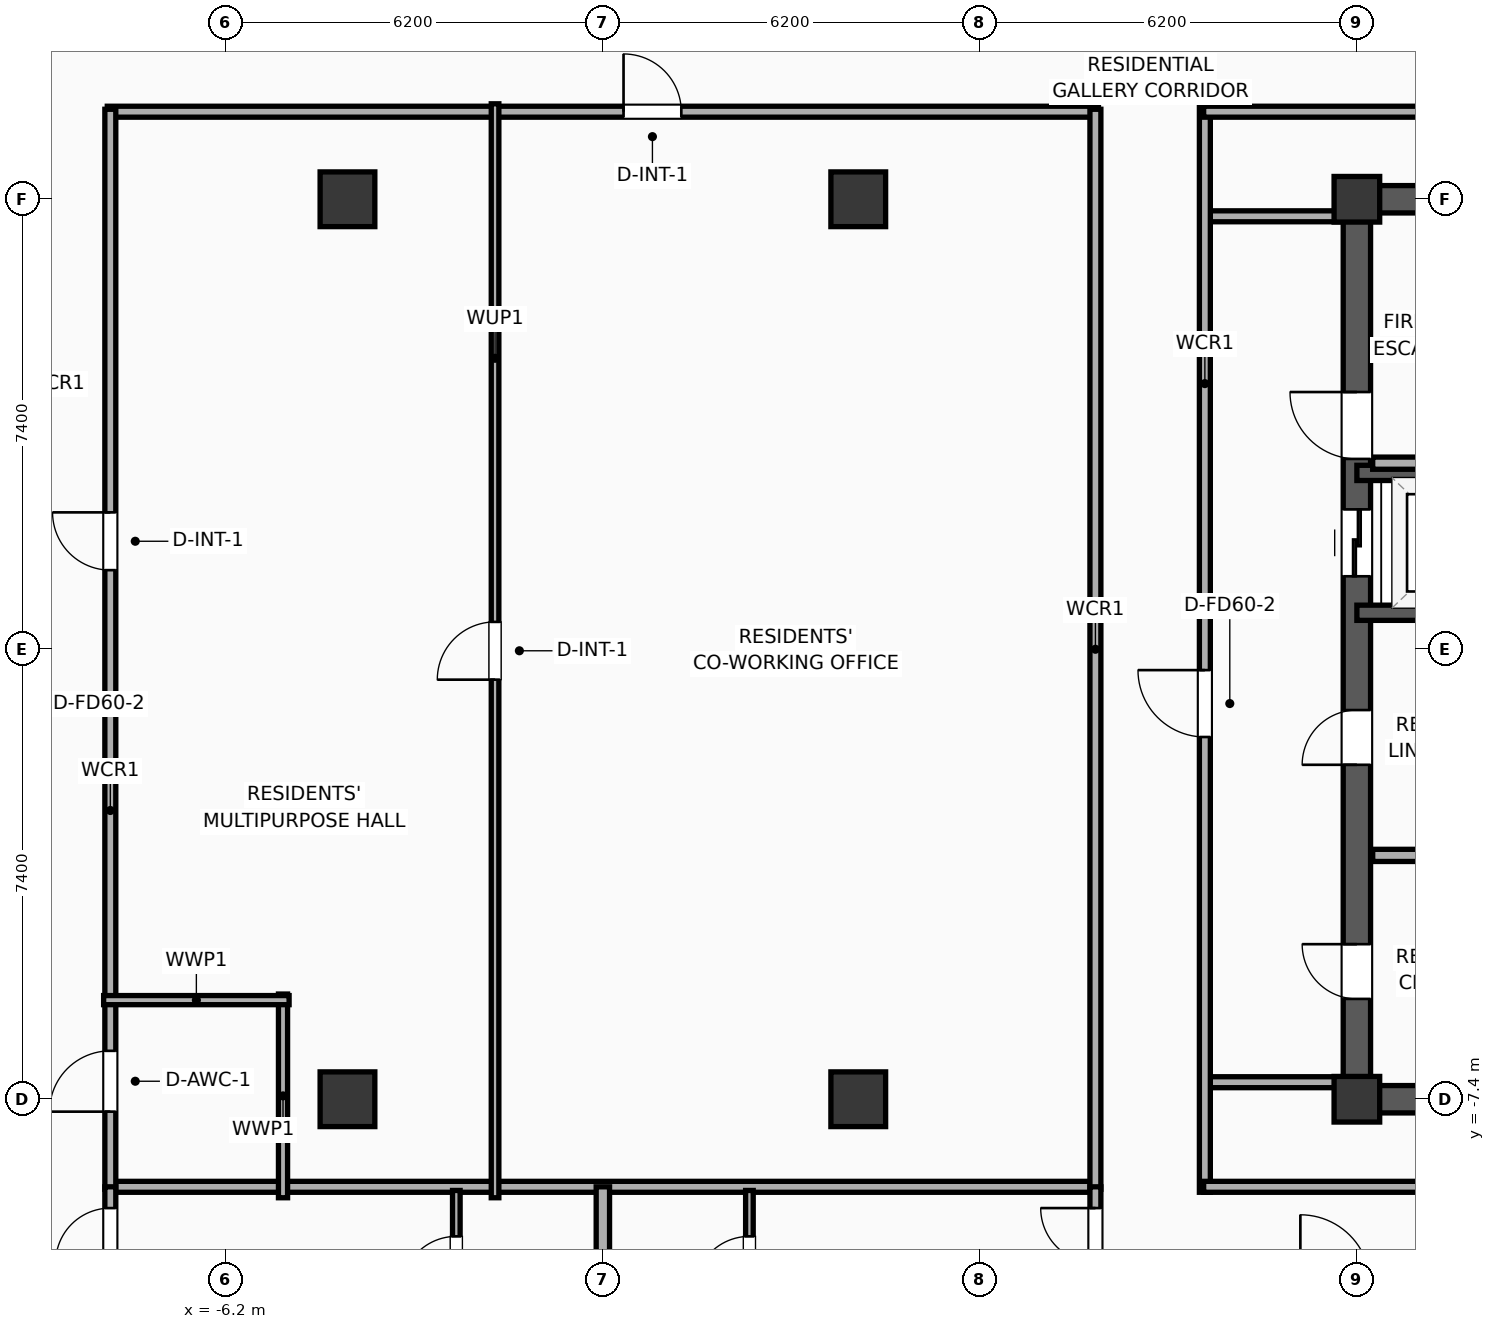
"""IFC4 building model, lengths in metres.
Left out: names, types, materials, properties, quantities, classifications, styles, units other than length and angle.
Written with IfcOpenShell. Run it as: python <this file> out.ifc"""

import sys

from ifc_helpers import new_model, si_unit, direction, frame, frame_2d, origin, origin_2d, place, context, subcontext, project, spatial, rectangle, extrude, element, fill, save


model = new_model("IFC4")
c1 = context("Model", 3, precision=1e-05, world=origin(), true_north=direction((0.0, 1.0)))
c2 = subcontext(c1, "Body", "Model", "MODEL_VIEW")
j1 = project(units=[si_unit("LENGTHUNIT", "METRE"), si_unit("PLANEANGLEUNIT", "RADIAN")], contexts=[c1])
p1 = place(None, origin())
s1 = spatial("IfcSite", under=j1, at=p1, CompositionType="ELEMENT")
p2 = place(p1, origin())
s2 = spatial("IfcBuilding", under=s1, at=p2, CompositionType="ELEMENT")
p3 = place(p2, frame((0.0, 0.0, 263.9)))
s3 = spatial("IfcBuildingStorey", under=s2, at=p3, CompositionType="ELEMENT", Elevation=263.9)
for number, where, z_axis, x_axis in (
    (1, (12.4, -7.4, 0.0), (0.0, 0.0, 1.0), (1.0, 0.0, 0.0)),
    (2, (12.4, 7.4, 0.0), (0.0, 0.0, 1.0), (1.0, 0.0, 0.0)),
):
    element("IfcColumn", number, at=place(p3, frame(where, z_axis=z_axis, x_axis=x_axis)), inside=s3, PredefinedType="COLUMN", context=c2, shape_type="SweptSolid", body=[
        extrude(rectangle(XDim=0.75, YDim=0.75, at=origin_2d()), origin(), (0.0, 0.0, 1.0), 3.9),
    ])
for number, where, z_axis, x_axis in (
    (3, (12.175, -7.4, 0.0), (0.0, 0.0, 1.0), (1.0, 0.0, 0.0)),
    (4, (12.175, 7.4, 0.0), (0.0, 0.0, 1.0), (1.0, 0.0, 0.0)),
):
    element("IfcWall", number, at=place(p3, frame(where, z_axis=z_axis, x_axis=x_axis)), inside=s3, PredefinedType="SHEAR", context=c2, shape_type="SweptSolid", body=[
        extrude(rectangle(XDim=7.25, YDim=0.45, at=frame_2d((3.625, 0.0))), origin(), (0.0, 0.0, 1.0), 3.65),
    ])
p4 = place(p3, frame((12.4, -7.4, 0.0), z_axis=(0.0, 0.0, 1.0), x_axis=(0.0, 1.0, 0.0)))
e5 = element("IfcWall", 5, at=p4, inside=s3, PredefinedType="SHEAR", context=c2, shape_type="SweptSolid", body=[
    extrude(rectangle(XDim=14.8, YDim=0.45, at=frame_2d((7.4, 0.0))), origin(), (0.0, 0.0, 1.0), 3.65),
])
p5 = place(p4, frame((8.6, 0.0, 0.0)))
e6 = element("IfcOpeningElement", 6, at=p5, cuts=e5, PredefinedType="OPENING", context=c2, shape_type="SweptSolid", body=[
    extrude(rectangle(XDim=1.1, YDim=2.05, at=frame_2d((0.55, 1.025))), frame((0.0, 0.235, 0.0), z_axis=(0.0, -1.0, 0.0), x_axis=(1.0, 0.0, 0.0)), (0.0, 0.0, 1.0), 0.47),
])
p6 = place(p4, frame((10.53, 0.0, 0.0)))
e7 = element("IfcOpeningElement", 7, at=p6, cuts=e5, PredefinedType="OPENING", context=c2, shape_type="SweptSolid", body=[
    extrude(rectangle(XDim=1.1, YDim=2.05, at=frame_2d((0.55, 1.025))), frame((0.0, 0.235, 0.0), z_axis=(0.0, -1.0, 0.0), x_axis=(1.0, 0.0, 0.0)), (0.0, 0.0, 1.0), 0.47),
])
p7 = place(p4, frame((1.65, 0.0, 0.0)))
e8 = element("IfcOpeningElement", 8, at=p7, cuts=e5, PredefinedType="OPENING", context=c2, shape_type="SweptSolid", body=[
    extrude(rectangle(XDim=0.9, YDim=2.05, at=frame_2d((0.45, 1.025))), frame((0.0, 0.235, 0.0), z_axis=(0.0, -1.0, 0.0), x_axis=(1.0, 0.0, 0.0)), (0.0, 0.0, 1.0), 0.47),
])
p8 = place(p4, frame((5.5, 0.0, 0.0)))
e9 = element("IfcOpeningElement", 9, at=p8, cuts=e5, PredefinedType="OPENING", context=c2, shape_type="SweptSolid", body=[
    extrude(rectangle(XDim=0.9, YDim=2.05, at=frame_2d((0.45, 1.025))), frame((0.0, 0.235, 0.0), z_axis=(0.0, -1.0, 0.0), x_axis=(1.0, 0.0, 0.0)), (0.0, 0.0, 1.0), 0.47),
])
for number, where, z_axis, x_axis in (
    (10, (-4.2, -7.4, 0.0), (0.0, 0.0, 1.0), (1.0, 0.0, 0.0)),
    (11, (-4.2, 7.4, 0.0), (0.0, 0.0, 1.0), (1.0, 0.0, 0.0)),
    (12, (4.2, -7.4, 0.0), (0.0, 0.0, 1.0), (1.0, 0.0, 0.0)),
    (13, (4.2, 7.4, 0.0), (0.0, 0.0, 1.0), (1.0, 0.0, 0.0)),
):
    element("IfcColumn", number, at=place(p3, frame(where, z_axis=z_axis, x_axis=x_axis)), inside=s3, PredefinedType="COLUMN", context=c2, shape_type="SweptSolid", body=[
        extrude(rectangle(XDim=0.9, YDim=0.9, at=origin_2d()), origin(), (0.0, 0.0, 1.0), 3.9),
    ])
for number, where, z_axis, x_axis in (
    (14, (12.4, 0.6, 0.0), (0.0, 0.0, 1.0), (1.0, 0.0, 0.0)),
    (15, (15.4, 2.9, 0.0), (0.0, 0.0, 1.0), (-1.0, 0.0, 0.0)),
):
    element("IfcWall", number, at=place(p3, frame(where, z_axis=z_axis, x_axis=x_axis)), inside=s3, PredefinedType="SOLIDWALL", context=c2, shape_type="SweptSolid", body=[
        extrude(rectangle(XDim=3.0, YDim=0.25, at=frame_2d((1.5, 0.0))), origin(), (0.0, 0.0, 1.0), 3.65),
    ])
p9 = place(p3, frame((12.66, 3.06, 0.0), z_axis=(0.0, 0.0, 1.0), x_axis=(1.0, 0.0, 0.0)))
e16 = element("IfcWall", 16, at=p9, inside=s3, PredefinedType="PARTITIONING", context=c2, shape_type="SweptSolid", body=[
    extrude(rectangle(XDim=3.16, YDim=0.2, at=frame_2d((1.58, 0.0))), origin(), (0.0, 0.0, 1.0), 3.65),
])
p10 = place(p3, frame((12.66, -3.39, 0.0), z_axis=(0.0, 0.0, 1.0), x_axis=(1.0, 0.0, 0.0)))
e17 = element("IfcWall", 17, at=p10, inside=s3, PredefinedType="PARTITIONING", context=c2, shape_type="SweptSolid", body=[
    extrude(rectangle(XDim=2.94, YDim=0.2, at=frame_2d((1.47, 0.0))), origin(), (0.0, 0.0, 1.0), 3.65),
])
for number, where, z_axis, x_axis in (
    (18, (9.88, 7.12, 0.0), (0.0, 0.0, 1.0), (1.0, 0.0, 0.0)),
    (19, (9.88, -7.12, 0.0), (0.0, 0.0, 1.0), (1.0, 0.0, 0.0)),
):
    element("IfcWall", number, at=place(p3, frame(where, z_axis=z_axis, x_axis=x_axis)), inside=s3, PredefinedType="PARTITIONING", context=c2, shape_type="SweptSolid", body=[
        extrude(rectangle(XDim=2.27, YDim=0.18, at=frame_2d((1.135, 0.0))), origin(), (0.0, 0.0, 1.0), 3.65),
    ])
p11 = place(p3, frame((9.9, -8.93, 0.0), z_axis=(0.0, 0.0, 1.0), x_axis=(0.0, 1.0, 0.0)))
e20 = element("IfcWall", 20, at=p11, inside=s3, PredefinedType="PARTITIONING", context=c2, shape_type="SweptSolid", body=[
    extrude(rectangle(XDim=17.86, YDim=0.18, at=frame_2d((8.93, 0.0))), origin(), (0.0, 0.0, 1.0), 3.65),
])
p12 = place(p11, frame((7.487, 0.0, 0.0)))
e21 = element("IfcOpeningElement", 21, at=p12, cuts=e20, PredefinedType="OPENING", context=c2, shape_type="SweptSolid", body=[
    extrude(rectangle(XDim=1.1, YDim=2.05, at=frame_2d((0.55, 1.025))), frame((0.0, 0.1, 0.0), z_axis=(0.0, -1.0, 0.0), x_axis=(1.0, 0.0, 0.0)), (0.0, 0.0, 1.0), 0.2),
])
p13 = place(p3, frame((9.88, 8.84, 0.0), z_axis=(0.0, 0.0, 1.0), x_axis=(1.0, 0.0, 0.0)))
e22 = element("IfcWall", 22, at=p13, inside=s3, PredefinedType="PARTITIONING", context=c2, shape_type="SweptSolid", body=[
    extrude(rectangle(XDim=15.427, YDim=0.18, at=frame_2d((7.713, 0.0))), origin(), (0.0, 0.0, 1.0), 3.65),
])
p14 = place(p13, frame((12.663, 0.0, 0.0)))
e23 = element("IfcOpeningElement", 23, at=p14, cuts=e22, PredefinedType="OPENING", context=c2, shape_type="SweptSolid", body=[
    extrude(rectangle(XDim=0.9, YDim=2.05, at=frame_2d((0.45, 1.025))), frame((0.0, 0.1, 0.0), z_axis=(0.0, -1.0, 0.0), x_axis=(1.0, 0.0, 0.0)), (0.0, 0.0, 1.0), 0.2),
])
p15 = place(p3, frame((9.88, -8.84, 0.0), z_axis=(0.0, 0.0, 1.0), x_axis=(1.0, 0.0, 0.0)))
e24 = element("IfcWall", 24, at=p15, inside=s3, PredefinedType="PARTITIONING", context=c2, shape_type="SweptSolid", body=[
    extrude(rectangle(XDim=13.569, YDim=0.18, at=frame_2d((6.784, 0.0))), origin(), (0.0, 0.0, 1.0), 3.65),
])
p16 = place(p3, frame((-8.15, 8.84, 0.0), z_axis=(0.0, 0.0, 1.0), x_axis=(1.0, 0.0, 0.0)))
e25 = element("IfcWall", 25, at=p16, inside=s3, PredefinedType="PARTITIONING", context=c2, shape_type="SweptSolid", body=[
    extrude(rectangle(XDim=16.3, YDim=0.18, at=frame_2d((8.15, 0.0))), origin(), (0.0, 0.0, 1.0), 3.65),
])
p17 = place(p16, frame((8.49, 0.0, 0.0)))
e26 = element("IfcOpeningElement", 26, at=p17, cuts=e25, PredefinedType="OPENING", context=c2, shape_type="SweptSolid", body=[
    extrude(rectangle(XDim=0.95, YDim=2.05, at=frame_2d((0.475, 1.025))), frame((0.0, 0.1, 0.0), z_axis=(0.0, -1.0, 0.0), x_axis=(1.0, 0.0, 0.0)), (0.0, 0.0, 1.0), 0.2),
])
p18 = place(p3, frame((-8.15, -8.84, 0.0), z_axis=(0.0, 0.0, 1.0), x_axis=(1.0, 0.0, 0.0)))
e27 = element("IfcWall", 27, at=p18, inside=s3, PredefinedType="PARTITIONING", context=c2, shape_type="SweptSolid", body=[
    extrude(rectangle(XDim=16.3, YDim=0.18, at=frame_2d((8.15, 0.0))), origin(), (0.0, 0.0, 1.0), 3.65),
])
p19 = place(p3, frame((-8.1, -8.88, 0.0), z_axis=(0.0, 0.0, 1.0), x_axis=(0.0, 1.0, 0.0)))
e28 = element("IfcWall", 28, at=p19, inside=s3, PredefinedType="PARTITIONING", context=c2, shape_type="SweptSolid", body=[
    extrude(rectangle(XDim=17.76, YDim=0.18, at=frame_2d((8.88, 0.0))), origin(), (0.0, 0.0, 1.0), 3.65),
])
p20 = place(p19, frame((1.276, 0.0, 0.0)))
e29 = element("IfcOpeningElement", 29, at=p20, cuts=e28, PredefinedType="OPENING", context=c2, shape_type="SweptSolid", body=[
    extrude(rectangle(XDim=1.0, YDim=2.05, at=frame_2d((0.5, 1.025))), frame((0.0, 0.1, 0.0), z_axis=(0.0, -1.0, 0.0), x_axis=(1.0, 0.0, 0.0)), (0.0, 0.0, 1.0), 0.2),
])
p21 = place(p19, frame((10.181, 0.0, 0.0)))
e30 = element("IfcOpeningElement", 30, at=p21, cuts=e28, PredefinedType="OPENING", context=c2, shape_type="SweptSolid", body=[
    extrude(rectangle(XDim=0.95, YDim=2.05, at=frame_2d((0.475, 1.025))), frame((0.0, 0.1, 0.0), z_axis=(0.0, -1.0, 0.0), x_axis=(1.0, 0.0, 0.0)), (0.0, 0.0, 1.0), 0.2),
])
p22 = place(p3, frame((8.1, -8.88, 0.0), z_axis=(0.0, 0.0, 1.0), x_axis=(0.0, 1.0, 0.0)))
e31 = element("IfcWall", 31, at=p22, inside=s3, PredefinedType="PARTITIONING", context=c2, shape_type="SweptSolid", body=[
    extrude(rectangle(XDim=17.76, YDim=0.18, at=frame_2d((8.88, 0.0))), origin(), (0.0, 0.0, 1.0), 3.65),
])
p23 = place(p3, frame((-5.26, -9.02, 0.0), z_axis=(0.0, 0.0, 1.0), x_axis=(0.0, 1.0, 0.0)))
e32 = element("IfcWall", 32, at=p23, inside=s3, PredefinedType="PLUMBINGWALL", context=c2, shape_type="SweptSolid", body=[
    extrude(rectangle(XDim=3.35, YDim=0.15, at=frame_2d((1.675, 0.0))), origin(), (0.0, 0.0, 1.0), 3.65),
])
p24 = place(p3, frame((-8.21, -5.77, 0.0), z_axis=(0.0, 0.0, 1.0), x_axis=(1.0, 0.0, 0.0)))
e33 = element("IfcWall", 33, at=p24, inside=s3, PredefinedType="PLUMBINGWALL", context=c2, shape_type="SweptSolid", body=[
    extrude(rectangle(XDim=3.05, YDim=0.15, at=frame_2d((1.525, 0.0))), origin(), (0.0, 0.0, 1.0), 3.65),
])
p25 = place(p3, frame((-1.773, -9.02, 0.0), z_axis=(0.0, 0.0, 1.0), x_axis=(0.0, 1.0, 0.0)))
e34 = element("IfcWall", 34, at=p25, inside=s3, PredefinedType="PARTITIONING", context=c2, shape_type="SweptSolid", body=[
    extrude(rectangle(XDim=17.99, YDim=0.125, at=frame_2d((8.995, 0.0))), origin(), (0.0, 0.0, 1.0), 3.65),
])
p26 = place(p25, frame((8.52, 0.0, 0.0)))
e35 = element("IfcOpeningElement", 35, at=p26, cuts=e34, PredefinedType="OPENING", context=c2, shape_type="SweptSolid", body=[
    extrude(rectangle(XDim=0.95, YDim=2.05, at=frame_2d((0.475, 1.025))), frame((0.0, 0.073, 0.0), z_axis=(0.0, -1.0, 0.0), x_axis=(1.0, 0.0, 0.0)), (0.0, 0.0, 1.0), 0.145),
])
p27 = place(p3, frame((-2.41, -11.31, 0.0), z_axis=(0.0, 0.0, 1.0), x_axis=(0.0, 1.0, 0.0)))
e36 = element("IfcWall", 36, at=p27, inside=s3, PredefinedType="PARTITIONING", context=c2, shape_type="SweptSolid", body=[
    extrude(rectangle(XDim=2.41, YDim=0.125, at=frame_2d((1.205, 0.0))), origin(), (0.0, 0.0, 1.0), 3.65),
])
p28 = place(p27, frame((0.755, 0.0, 0.0)))
e37 = element("IfcOpeningElement", 37, at=p28, cuts=e36, PredefinedType="OPENING", context=c2, shape_type="SweptSolid", body=[
    extrude(rectangle(XDim=0.9, YDim=2.05, at=frame_2d((0.45, 1.025))), frame((0.0, 0.073, 0.0), z_axis=(0.0, -1.0, 0.0), x_axis=(1.0, 0.0, 0.0)), (0.0, 0.0, 1.0), 0.145),
])
p29 = place(p3, frame((-8.1, -18.155, 0.0), z_axis=(0.0, 0.0, 1.0), x_axis=(0.0, 1.0, 0.0)))
e38 = element("IfcWall", 38, at=p29, inside=s3, PredefinedType="PARTITIONING", context=c2, shape_type="SweptSolid", body=[
    extrude(rectangle(XDim=9.314, YDim=0.18, at=frame_2d((4.657, 0.0))), origin(), (0.0, 0.0, 1.0), 3.65),
])
p30 = place(p29, frame((8.064, 0.0, 0.0)))
e39 = element("IfcOpeningElement", 39, at=p30, cuts=e38, PredefinedType="OPENING", context=c2, shape_type="SweptSolid", body=[
    extrude(rectangle(XDim=0.9, YDim=2.05, at=frame_2d((0.45, 1.025))), frame((0.0, 0.1, 0.0), z_axis=(0.0, -1.0, 0.0), x_axis=(1.0, 0.0, 0.0)), (0.0, 0.0, 1.0), 0.2),
])
p31 = place(p3, frame((2.41, -11.31, 0.0), z_axis=(0.0, 0.0, 1.0), x_axis=(0.0, 1.0, 0.0)))
e40 = element("IfcWall", 40, at=p31, inside=s3, PredefinedType="PARTITIONING", context=c2, shape_type="SweptSolid", body=[
    extrude(rectangle(XDim=2.41, YDim=0.125, at=frame_2d((1.205, 0.0))), origin(), (0.0, 0.0, 1.0), 3.65),
])
p32 = place(p31, frame((0.755, 0.0, 0.0)))
e41 = element("IfcOpeningElement", 41, at=p32, cuts=e40, PredefinedType="OPENING", context=c2, shape_type="SweptSolid", body=[
    extrude(rectangle(XDim=0.9, YDim=2.05, at=frame_2d((0.45, 1.025))), frame((0.0, 0.073, 0.0), z_axis=(0.0, -1.0, 0.0), x_axis=(1.0, 0.0, 0.0)), (0.0, 0.0, 1.0), 0.145),
])
p33 = place(p3, frame((8.1, -19.857, 0.0), z_axis=(0.0, 0.0, 1.0), x_axis=(0.0, 1.0, 0.0)))
e42 = element("IfcWall", 42, at=p33, inside=s3, PredefinedType="PARTITIONING", context=c2, shape_type="SweptSolid", body=[
    extrude(rectangle(XDim=11.017, YDim=0.18, at=frame_2d((5.509, 0.0))), origin(), (0.0, 0.0, 1.0), 3.65),
])
p34 = place(p33, frame((9.767, 0.0, 0.0)))
e43 = element("IfcOpeningElement", 43, at=p34, cuts=e42, PredefinedType="OPENING", context=c2, shape_type="SweptSolid", body=[
    extrude(rectangle(XDim=0.9, YDim=2.05, at=frame_2d((0.45, 1.025))), frame((0.0, 0.1, 0.0), z_axis=(0.0, -1.0, 0.0), x_axis=(1.0, 0.0, 0.0)), (0.0, 0.0, 1.0), 0.2),
])
p35 = place(p3, frame((0.0, -19.006, 0.0), z_axis=(0.0, 0.0, 1.0), x_axis=(0.0, 1.0, 0.0)))
e44 = element("IfcWall", 44, at=p35, inside=s3, PredefinedType="PARTITIONING", context=c2, shape_type="SweptSolid", body=[
    extrude(rectangle(XDim=10.166, YDim=0.22, at=frame_2d((5.083, 0.0))), origin(), (0.0, 0.0, 1.0), 3.65),
])
p36 = place(p5, origin())
e45 = element("IfcDoor", 45, at=p36, inside=s3, OperationType="SLIDING_TO_LEFT", PredefinedType="DOOR", context=c2, shape_type="SweptSolid", body=[
    extrude(rectangle(XDim=1.1, YDim=2.05, at=frame_2d((0.55, 1.025))), frame((0.0, 0.025, 0.0), z_axis=(0.0, -1.0, 0.0), x_axis=(1.0, 0.0, 0.0)), (0.0, 0.0, 1.0), 0.05),
])
fill(e6, e45)
p37 = place(p12, origin())
e46 = element("IfcDoor", 46, at=p37, inside=s3, OperationType="SINGLE_SWING_RIGHT", PredefinedType="DOOR", context=c2, shape_type="SweptSolid", body=[
    extrude(rectangle(XDim=1.1, YDim=2.05, at=frame_2d((0.55, 1.025))), frame((0.0, 0.025, 0.0), z_axis=(0.0, -1.0, 0.0), x_axis=(1.0, 0.0, 0.0)), (0.0, 0.0, 1.0), 0.05),
])
fill(e21, e46)
p38 = place(p17, origin())
e47 = element("IfcDoor", 47, at=p38, inside=s3, OperationType="SINGLE_SWING_LEFT", PredefinedType="DOOR", context=c2, shape_type="SweptSolid", body=[
    extrude(rectangle(XDim=0.95, YDim=2.05, at=frame_2d((0.475, 1.025))), frame((0.0, 0.025, 0.0), z_axis=(0.0, -1.0, 0.0), x_axis=(1.0, 0.0, 0.0)), (0.0, 0.0, 1.0), 0.05),
])
fill(e26, e47)
p39 = place(p20, origin())
e48 = element("IfcDoor", 48, at=p39, inside=s3, OperationType="SINGLE_SWING_LEFT", PredefinedType="DOOR", context=c2, shape_type="SweptSolid", body=[
    extrude(rectangle(XDim=1.0, YDim=2.05, at=frame_2d((0.5, 1.025))), frame((0.0, 0.025, 0.0), z_axis=(0.0, -1.0, 0.0), x_axis=(1.0, 0.0, 0.0)), (0.0, 0.0, 1.0), 0.05),
])
fill(e29, e48)
p40 = place(p21, origin())
e49 = element("IfcDoor", 49, at=p40, inside=s3, OperationType="SINGLE_SWING_RIGHT", PredefinedType="DOOR", context=c2, shape_type="SweptSolid", body=[
    extrude(rectangle(XDim=0.95, YDim=2.05, at=frame_2d((0.475, 1.025))), frame((0.0, 0.025, 0.0), z_axis=(0.0, -1.0, 0.0), x_axis=(1.0, 0.0, 0.0)), (0.0, 0.0, 1.0), 0.05),
])
fill(e30, e49)
p41 = place(p26, origin())
e50 = element("IfcDoor", 50, at=p41, inside=s3, OperationType="SINGLE_SWING_LEFT", PredefinedType="DOOR", context=c2, shape_type="SweptSolid", body=[
    extrude(rectangle(XDim=0.95, YDim=2.05, at=frame_2d((0.475, 1.025))), frame((0.0, 0.025, 0.0), z_axis=(0.0, -1.0, 0.0), x_axis=(1.0, 0.0, 0.0)), (0.0, 0.0, 1.0), 0.05),
])
fill(e35, e50)
p42 = place(p28, origin())
e51 = element("IfcDoor", 51, at=p42, inside=s3, OperationType="SINGLE_SWING_LEFT", PredefinedType="DOOR", context=c2, shape_type="SweptSolid", body=[
    extrude(rectangle(XDim=0.9, YDim=2.05, at=frame_2d((0.45, 1.025))), frame((0.0, 0.025, 0.0), z_axis=(0.0, -1.0, 0.0), x_axis=(1.0, 0.0, 0.0)), (0.0, 0.0, 1.0), 0.05),
])
fill(e37, e51)
p43 = place(p30, origin())
e52 = element("IfcDoor", 52, at=p43, inside=s3, OperationType="SINGLE_SWING_LEFT", PredefinedType="DOOR", context=c2, shape_type="SweptSolid", body=[
    extrude(rectangle(XDim=0.9, YDim=2.05, at=frame_2d((0.45, 1.025))), frame((0.0, 0.025, 0.0), z_axis=(0.0, -1.0, 0.0), x_axis=(1.0, 0.0, 0.0)), (0.0, 0.0, 1.0), 0.05),
])
fill(e39, e52)
p44 = place(p32, origin())
e53 = element("IfcDoor", 53, at=p44, inside=s3, OperationType="SINGLE_SWING_LEFT", PredefinedType="DOOR", context=c2, shape_type="SweptSolid", body=[
    extrude(rectangle(XDim=0.9, YDim=2.05, at=frame_2d((0.45, 1.025))), frame((0.0, 0.025, 0.0), z_axis=(0.0, -1.0, 0.0), x_axis=(1.0, 0.0, 0.0)), (0.0, 0.0, 1.0), 0.05),
])
fill(e41, e53)
p45 = place(p34, origin())
e54 = element("IfcDoor", 54, at=p45, inside=s3, OperationType="SINGLE_SWING_RIGHT", PredefinedType="DOOR", context=c2, shape_type="SweptSolid", body=[
    extrude(rectangle(XDim=0.9, YDim=2.05, at=frame_2d((0.45, 1.025))), frame((0.0, 0.025, 0.0), z_axis=(0.0, -1.0, 0.0), x_axis=(1.0, 0.0, 0.0)), (0.0, 0.0, 1.0), 0.05),
])
fill(e43, e54)
p46 = place(p6, origin())
e55 = element("IfcDoor", 55, at=p46, inside=s3, OperationType="SINGLE_SWING_RIGHT", PredefinedType="DOOR", context=c2, shape_type="SweptSolid", body=[
    extrude(rectangle(XDim=1.1, YDim=2.05, at=frame_2d((0.55, 1.025))), frame((0.0, 0.025, 0.0), z_axis=(0.0, -1.0, 0.0), x_axis=(1.0, 0.0, 0.0)), (0.0, 0.0, 1.0), 0.05),
])
fill(e7, e55)
p47 = place(p7, origin())
e56 = element("IfcDoor", 56, at=p47, inside=s3, OperationType="SINGLE_SWING_RIGHT", PredefinedType="DOOR", context=c2, shape_type="SweptSolid", body=[
    extrude(rectangle(XDim=0.9, YDim=2.05, at=frame_2d((0.45, 1.025))), frame((0.0, 0.025, 0.0), z_axis=(0.0, -1.0, 0.0), x_axis=(1.0, 0.0, 0.0)), (0.0, 0.0, 1.0), 0.05),
])
fill(e8, e56)
p48 = place(p8, origin())
e57 = element("IfcDoor", 57, at=p48, inside=s3, OperationType="SINGLE_SWING_LEFT", PredefinedType="DOOR", context=c2, shape_type="SweptSolid", body=[
    extrude(rectangle(XDim=0.9, YDim=2.05, at=frame_2d((0.45, 1.025))), frame((0.0, 0.025, 0.0), z_axis=(0.0, -1.0, 0.0), x_axis=(1.0, 0.0, 0.0)), (0.0, 0.0, 1.0), 0.05),
])
fill(e9, e57)
save(model, sys.argv[1])
